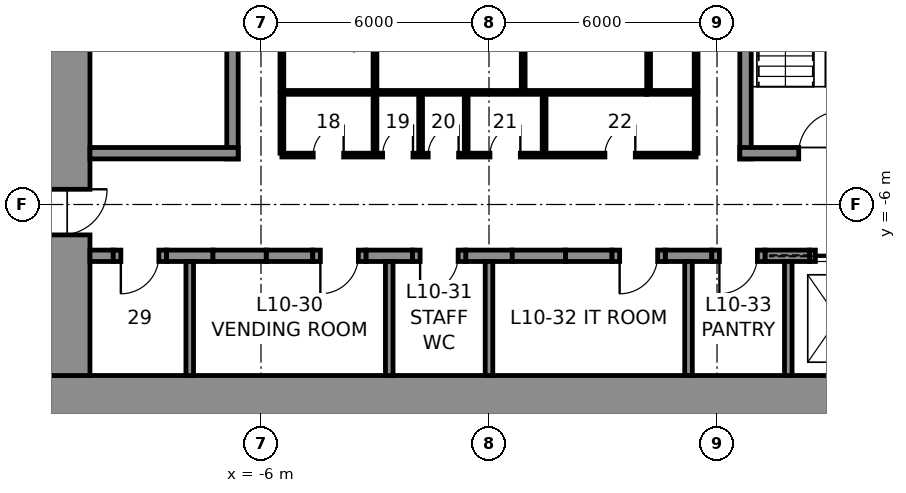
"""IFC4 building model, lengths in metres.
Left out: names, types, materials, properties, quantities, classifications, styles, units other than length and angle.
Written with IfcOpenShell. Run it as: python <this file> out.ifc"""

import sys

from ifc_helpers import new_model, si_unit, direction, frame, frame_2d, origin, place, context, subcontext, project, spatial, rectangle, extrude, element, fill, save


model = new_model("IFC4")
c1 = context("Model", 3, precision=1e-05, world=origin(), true_north=direction((0.0, 1.0)))
c2 = subcontext(c1, "Body", "Model", "MODEL_VIEW")
j1 = project(units=[si_unit("LENGTHUNIT", "METRE"), si_unit("PLANEANGLEUNIT", "RADIAN")], contexts=[c1])
p1 = place(None, origin())
s1 = spatial("IfcSite", under=j1, at=p1, CompositionType="ELEMENT")
p2 = place(p1, origin())
s2 = spatial("IfcBuilding", under=s1, at=p2, CompositionType="ELEMENT")
p3 = place(p2, frame((0.0, 0.0, 54.0)))
s3 = spatial("IfcBuildingStorey", under=s2, at=p3, CompositionType="ELEMENT", Elevation=54.0)
p4 = place(p3, frame((12.0, -11.25, 0.0), z_axis=(0.0, 0.0, 1.0), x_axis=(-1.0, 0.0, 0.0)))
e1 = element("IfcWall", 1, at=p4, inside=s3, PredefinedType="SHEAR", context=c2, shape_type="SweptSolid", body=[
    extrude(rectangle(XDim=24.0, YDim=1.5, at=frame_2d((12.0, 0.0))), origin(), (0.0, 0.0, 1.0), 5.5),
])
p5 = place(p3, frame((-11.25, -10.5, 0.0), z_axis=(0.0, 0.0, 1.0), x_axis=(0.0, 1.0, 0.0)))
e2 = element("IfcWall", 2, at=p5, inside=s3, PredefinedType="SHEAR", context=c2, shape_type="SweptSolid", body=[
    extrude(rectangle(XDim=21.0, YDim=1.5, at=frame_2d((10.5, 0.0))), origin(), (0.0, 0.0, 1.0), 5.5),
])
p6 = place(p5, frame((16.1, 0.0, 0.0)))
e3 = element("IfcOpeningElement", 3, at=p6, cuts=e2, PredefinedType="OPENING", context=c2, shape_type="SweptSolid", body=[
    extrude(rectangle(XDim=1.2, YDim=2.3, at=frame_2d((0.6, 1.15))), frame((0.0, 0.76, 0.0), z_axis=(0.0, -1.0, 0.0), x_axis=(1.0, 0.0, 0.0)), (0.0, 0.0, 1.0), 1.52),
])
p7 = place(p5, frame((3.7, 0.0, 0.0)))
e4 = element("IfcOpeningElement", 4, at=p7, cuts=e2, PredefinedType="OPENING", context=c2, shape_type="SweptSolid", body=[
    extrude(rectangle(XDim=1.2, YDim=2.3, at=frame_2d((0.6, 1.15))), frame((0.0, 0.76, 0.0), z_axis=(0.0, -1.0, 0.0), x_axis=(1.0, 0.0, 0.0)), (0.0, 0.0, 1.0), 1.52),
])
p8 = place(p3, frame((-10.5, -7.35, 0.0), z_axis=(0.0, 0.0, 1.0), x_axis=(1.0, 0.0, 0.0)))
e5 = element("IfcWall", 5, at=p8, inside=s3, PredefinedType="SHEAR", context=c2, shape_type="SweptSolid", body=[
    extrude(rectangle(XDim=0.613, YDim=0.3, at=frame_2d((0.306, 0.0))), origin(), (0.0, 0.0, 1.0), 5.5),
])
for number, where, z_axis, x_axis in (
    (6, (-8.488, -7.35, 0.0), (0.0, 0.0, 1.0), (1.0, 0.0, 0.0)),
    (7, (-5.863, -7.35, 0.0), (0.0, 0.0, 1.0), (1.0, 0.0, 0.0)),
    (8, (-3.238, -7.35, 0.0), (0.0, 0.0, 1.0), (1.0, 0.0, 0.0)),
    (9, (-0.613, -7.35, 0.0), (0.0, 0.0, 1.0), (1.0, 0.0, 0.0)),
    (10, (2.012, -7.35, 0.0), (0.0, 0.0, 1.0), (1.0, 0.0, 0.0)),
    (11, (4.637, -7.35, 0.0), (0.0, 0.0, 1.0), (1.0, 0.0, 0.0)),
):
    element("IfcWall", number, at=place(p3, frame(where, z_axis=z_axis, x_axis=x_axis)), inside=s3, PredefinedType="SHEAR", context=c2, shape_type="SweptSolid", body=[
        extrude(rectangle(XDim=1.225, YDim=0.3, at=frame_2d((0.613, 0.0))), origin(), (0.0, 0.0, 1.0), 5.5),
    ])
p9 = place(p3, frame((7.262, -7.35, 0.0), z_axis=(0.0, 0.0, 1.0), x_axis=(1.0, 0.0, 0.0)))
e12 = element("IfcWall", 12, at=p9, inside=s3, PredefinedType="SHEAR", context=c2, shape_type="SweptSolid", body=[
    extrude(rectangle(XDim=1.175, YDim=0.3, at=frame_2d((0.587, 0.0))), origin(), (0.0, 0.0, 1.0), 5.5),
])
p10 = place(p3, frame((-9.887, -7.35, 0.0), z_axis=(0.0, 0.0, 1.0), x_axis=(1.0, 0.0, 0.0)))
e13 = element("IfcWall", 13, at=p10, inside=s3, PredefinedType="PARTITIONING", context=c2, shape_type="SweptSolid", body=[
    extrude(rectangle(XDim=1.4, YDim=0.3, at=frame_2d((0.7, 0.0))), origin(), (0.0, 0.0, 1.0), 5.5),
])
p11 = place(p10, frame((0.2, 0.0, 0.0)))
e14 = element("IfcOpeningElement", 14, at=p11, cuts=e13, PredefinedType="OPENING", context=c2, shape_type="SweptSolid", body=[
    extrude(rectangle(XDim=1.0, YDim=2.3, at=frame_2d((0.5, 1.15))), frame((0.0, 0.16, 0.0), z_axis=(0.0, -1.0, 0.0), x_axis=(1.0, 0.0, 0.0)), (0.0, 0.0, 1.0), 0.32),
])
p12 = place(p3, frame((-7.262, -7.35, 0.0), z_axis=(0.0, 0.0, 1.0), x_axis=(1.0, 0.0, 0.0)))
e15 = element("IfcWall", 15, at=p12, inside=s3, PredefinedType="PARTITIONING", context=c2, shape_type="SweptSolid", body=[
    extrude(rectangle(XDim=1.4, YDim=0.3, at=frame_2d((0.7, 0.0))), origin(), (0.0, 0.0, 1.0), 5.5),
])
p13 = place(p3, frame((-4.637, -7.35, 0.0), z_axis=(0.0, 0.0, 1.0), x_axis=(1.0, 0.0, 0.0)))
e16 = element("IfcWall", 16, at=p13, inside=s3, PredefinedType="PARTITIONING", context=c2, shape_type="SweptSolid", body=[
    extrude(rectangle(XDim=1.4, YDim=0.3, at=frame_2d((0.7, 0.0))), origin(), (0.0, 0.0, 1.0), 5.5),
])
p14 = place(p13, frame((0.2, 0.0, 0.0)))
e17 = element("IfcOpeningElement", 17, at=p14, cuts=e16, PredefinedType="OPENING", context=c2, shape_type="SweptSolid", body=[
    extrude(rectangle(XDim=1.0, YDim=2.3, at=frame_2d((0.5, 1.15))), frame((0.0, 0.16, 0.0), z_axis=(0.0, -1.0, 0.0), x_axis=(1.0, 0.0, 0.0)), (0.0, 0.0, 1.0), 0.32),
])
p15 = place(p3, frame((-2.012, -7.35, 0.0), z_axis=(0.0, 0.0, 1.0), x_axis=(1.0, 0.0, 0.0)))
e18 = element("IfcWall", 18, at=p15, inside=s3, PredefinedType="PARTITIONING", context=c2, shape_type="SweptSolid", body=[
    extrude(rectangle(XDim=1.4, YDim=0.3, at=frame_2d((0.7, 0.0))), origin(), (0.0, 0.0, 1.0), 5.5),
])
p16 = place(p15, frame((0.2, 0.0, 0.0)))
e19 = element("IfcOpeningElement", 19, at=p16, cuts=e18, PredefinedType="OPENING", context=c2, shape_type="SweptSolid", body=[
    extrude(rectangle(XDim=1.0, YDim=2.3, at=frame_2d((0.5, 1.15))), frame((0.0, 0.16, 0.0), z_axis=(0.0, -1.0, 0.0), x_axis=(1.0, 0.0, 0.0)), (0.0, 0.0, 1.0), 0.32),
])
p17 = place(p3, frame((0.613, -7.35, 0.0), z_axis=(0.0, 0.0, 1.0), x_axis=(1.0, 0.0, 0.0)))
e20 = element("IfcWall", 20, at=p17, inside=s3, PredefinedType="PARTITIONING", context=c2, shape_type="SweptSolid", body=[
    extrude(rectangle(XDim=1.4, YDim=0.3, at=frame_2d((0.7, 0.0))), origin(), (0.0, 0.0, 1.0), 5.5),
])
p18 = place(p3, frame((3.238, -7.35, 0.0), z_axis=(0.0, 0.0, 1.0), x_axis=(1.0, 0.0, 0.0)))
e21 = element("IfcWall", 21, at=p18, inside=s3, PredefinedType="PARTITIONING", context=c2, shape_type="SweptSolid", body=[
    extrude(rectangle(XDim=1.4, YDim=0.3, at=frame_2d((0.7, 0.0))), origin(), (0.0, 0.0, 1.0), 5.5),
])
p19 = place(p18, frame((0.2, 0.0, 0.0)))
e22 = element("IfcOpeningElement", 22, at=p19, cuts=e21, PredefinedType="OPENING", context=c2, shape_type="SweptSolid", body=[
    extrude(rectangle(XDim=1.0, YDim=2.3, at=frame_2d((0.5, 1.15))), frame((0.0, 0.16, 0.0), z_axis=(0.0, -1.0, 0.0), x_axis=(1.0, 0.0, 0.0)), (0.0, 0.0, 1.0), 0.32),
])
p20 = place(p3, frame((5.863, -7.35, 0.0), z_axis=(0.0, 0.0, 1.0), x_axis=(1.0, 0.0, 0.0)))
e23 = element("IfcWall", 23, at=p20, inside=s3, PredefinedType="PARTITIONING", context=c2, shape_type="SweptSolid", body=[
    extrude(rectangle(XDim=1.4, YDim=0.3, at=frame_2d((0.7, 0.0))), origin(), (0.0, 0.0, 1.0), 5.5),
])
p21 = place(p20, frame((0.2, 0.0, 0.0)))
e24 = element("IfcOpeningElement", 24, at=p21, cuts=e23, PredefinedType="OPENING", context=c2, shape_type="SweptSolid", body=[
    extrude(rectangle(XDim=1.0, YDim=2.3, at=frame_2d((0.5, 1.15))), frame((0.0, 0.16, 0.0), z_axis=(0.0, -1.0, 0.0), x_axis=(1.0, 0.0, 0.0)), (0.0, 0.0, 1.0), 0.32),
])
p22 = place(p3, frame((8.438, -7.35, 0.0), z_axis=(0.0, 0.0, 1.0), x_axis=(1.0, 0.0, 0.0)))
e25 = element("IfcWall", 25, at=p22, inside=s3, PredefinedType="PARTITIONING", context=c2, shape_type="SweptSolid", body=[
    extrude(rectangle(XDim=1.5, YDim=0.3, at=frame_2d((0.75, 0.0))), origin(), (0.0, 0.0, 1.0), 5.5),
])
p23 = place(p22, frame((0.15, 0.0, 0.0)))
e26 = element("IfcOpeningElement", 26, at=p23, cuts=e25, PredefinedType="OPENING", context=c2, shape_type="SweptSolid", body=[
    extrude(rectangle(XDim=1.2, YDim=2.3, at=frame_2d((0.6, 1.15))), frame((0.0, 0.16, 0.0), z_axis=(0.0, -1.0, 0.0), x_axis=(1.0, 0.0, 0.0)), (0.0, 0.0, 1.0), 0.32),
])
for number, where, z_axis, x_axis in (
    (27, (-7.875, -10.5, 0.0), (0.0, 0.0, 1.0), (0.0, 1.0, 0.0)),
    (28, (-2.625, -10.5, 0.0), (0.0, 0.0, 1.0), (0.0, 1.0, 0.0)),
    (29, (0.0, -10.5, 0.0), (0.0, 0.0, 1.0), (0.0, 1.0, 0.0)),
    (30, (5.25, -10.5, 0.0), (0.0, 0.0, 1.0), (0.0, 1.0, 0.0)),
    (31, (7.875, -10.5, 0.0), (0.0, 0.0, 1.0), (0.0, 1.0, 0.0)),
):
    element("IfcWall", number, at=place(p3, frame(where, z_axis=z_axis, x_axis=x_axis)), inside=s3, PredefinedType="PARTITIONING", context=c2, shape_type="SweptSolid", body=[
        extrude(rectangle(XDim=3.0, YDim=0.2, at=frame_2d((1.5, 0.0))), origin(), (0.0, 0.0, 1.0), 5.5),
    ])
p24 = place(p3, frame((-6.75, -4.8, 0.0), z_axis=(0.0, 0.0, 1.0), x_axis=(0.0, 1.0, 0.0)))
e32 = element("IfcWall", 32, at=p24, inside=s3, PredefinedType="SOLIDWALL", context=c2, shape_type="SweptSolid", body=[
    extrude(rectangle(XDim=9.6, YDim=0.3, at=frame_2d((4.8, 0.0))), origin(), (0.0, 0.0, 1.0), 5.25),
])
p25 = place(p3, frame((-6.6, -4.65, 0.0), z_axis=(0.0, 0.0, 1.0), x_axis=(-1.0, 0.0, 0.0)))
e33 = element("IfcWall", 33, at=p25, inside=s3, PredefinedType="SOLIDWALL", context=c2, shape_type="SweptSolid", body=[
    extrude(rectangle(XDim=3.9, YDim=0.3, at=frame_2d((1.95, 0.0))), origin(), (0.0, 0.0, 1.0), 5.25),
])
p26 = place(p3, frame((6.75, -4.8, 0.0), z_axis=(0.0, 0.0, 1.0), x_axis=(0.0, 1.0, 0.0)))
e34 = element("IfcWall", 34, at=p26, inside=s3, PredefinedType="SOLIDWALL", context=c2, shape_type="SweptSolid", body=[
    extrude(rectangle(XDim=9.6, YDim=0.3, at=frame_2d((4.8, 0.0))), origin(), (0.0, 0.0, 1.0), 5.25),
])
p27 = place(p3, frame((10.5, -4.65, 0.0), z_axis=(0.0, 0.0, 1.0), x_axis=(-1.0, 0.0, 0.0)))
e35 = element("IfcWall", 35, at=p27, inside=s3, PredefinedType="SOLIDWALL", context=c2, shape_type="SweptSolid", body=[
    extrude(rectangle(XDim=3.9, YDim=0.3, at=frame_2d((1.95, 0.0))), origin(), (0.0, 0.0, 1.0), 5.25),
])
p28 = place(p27, frame((1.25, 0.0, 0.0)))
e36 = element("IfcOpeningElement", 36, at=p28, cuts=e35, PredefinedType="OPENING", context=c2, shape_type="SweptSolid", body=[
    extrude(rectangle(XDim=1.1, YDim=2.3, at=frame_2d((0.55, 1.15))), frame((0.0, 0.16, 0.0), z_axis=(0.0, -1.0, 0.0), x_axis=(1.0, 0.0, 0.0)), (0.0, 0.0, 1.0), 0.32),
])
p29 = place(p3, frame((4.15, -3.05, 0.0), z_axis=(0.0, 0.0, 1.0), x_axis=(-1.0, 0.0, 0.0)))
e37 = element("IfcWall", 37, at=p29, inside=s3, PredefinedType="PARTITIONING", context=c2, shape_type="SweptSolid", body=[
    extrude(rectangle(XDim=9.6, YDim=0.1, at=frame_2d((4.8, 0.0))), origin(), (0.0, 0.0, 1.0), 5.25),
])
p30 = place(p3, frame((5.45, -3.05, 0.0), z_axis=(0.0, 0.0, 1.0), x_axis=(-1.0, 0.0, 0.0)))
e38 = element("IfcWall", 38, at=p30, inside=s3, PredefinedType="PARTITIONING", context=c2, shape_type="SweptSolid", body=[
    extrude(rectangle(XDim=1.3, YDim=0.1, at=frame_2d((0.65, 0.0))), origin(), (0.0, 0.0, 1.0), 5.25),
])
for number, where, z_axis, x_axis in (
    (39, (5.45, 3.0, 0.0), (0.0, 0.0, 1.0), (0.0, -1.0, 0.0)),
    (40, (-5.45, -3.0, 0.0), (0.0, 0.0, 1.0), (0.0, 1.0, 0.0)),
    (41, (-3.0, -3.0, 0.0), (0.0, 0.0, 1.0), (0.0, 1.0, 0.0)),
    (42, (0.9, -3.0, 0.0), (0.0, 0.0, 1.0), (0.0, 1.0, 0.0)),
    (43, (4.2, -3.0, 0.0), (0.0, 0.0, 1.0), (0.0, 1.0, 0.0)),
):
    element("IfcWall", number, at=place(p3, frame(where, z_axis=z_axis, x_axis=x_axis)), inside=s3, PredefinedType="PARTITIONING", context=c2, shape_type="SweptSolid", body=[
        extrude(rectangle(XDim=6.0, YDim=0.1, at=frame_2d((3.0, 0.0))), origin(), (0.0, 0.0, 1.0), 5.25),
    ])
p31 = place(p3, frame((5.45, -4.7, 0.0), z_axis=(0.0, 0.0, 1.0), x_axis=(-1.0, 0.0, 0.0)))
e44 = element("IfcWall", 44, at=p31, inside=s3, PredefinedType="PARTITIONING", context=c2, shape_type="SweptSolid", body=[
    extrude(rectangle(XDim=10.9, YDim=0.1, at=frame_2d((5.45, 0.0))), origin(), (0.0, 0.0, 1.0), 5.25),
])
p32 = place(p31, frame((9.275, 0.0, 0.0)))
e45 = element("IfcOpeningElement", 45, at=p32, cuts=e44, PredefinedType="OPENING", context=c2, shape_type="SweptSolid", body=[
    extrude(rectangle(XDim=0.8, YDim=2.3, at=frame_2d((0.4, 1.15))), frame((0.0, 0.06, 0.0), z_axis=(0.0, -1.0, 0.0), x_axis=(1.0, 0.0, 0.0)), (0.0, 0.0, 1.0), 0.12),
])
p33 = place(p31, frame((7.45, 0.0, 0.0)))
e46 = element("IfcOpeningElement", 46, at=p33, cuts=e44, PredefinedType="OPENING", context=c2, shape_type="SweptSolid", body=[
    extrude(rectangle(XDim=0.8, YDim=2.3, at=frame_2d((0.4, 1.15))), frame((0.0, 0.06, 0.0), z_axis=(0.0, -1.0, 0.0), x_axis=(1.0, 0.0, 0.0)), (0.0, 0.0, 1.0), 0.12),
])
p34 = place(p31, frame((6.25, 0.0, 0.0)))
e47 = element("IfcOpeningElement", 47, at=p34, cuts=e44, PredefinedType="OPENING", context=c2, shape_type="SweptSolid", body=[
    extrude(rectangle(XDim=0.8, YDim=2.3, at=frame_2d((0.4, 1.15))), frame((0.0, 0.06, 0.0), z_axis=(0.0, -1.0, 0.0), x_axis=(1.0, 0.0, 0.0)), (0.0, 0.0, 1.0), 0.12),
])
p35 = place(p31, frame((4.625, 0.0, 0.0)))
e48 = element("IfcOpeningElement", 48, at=p35, cuts=e44, PredefinedType="OPENING", context=c2, shape_type="SweptSolid", body=[
    extrude(rectangle(XDim=0.8, YDim=2.3, at=frame_2d((0.4, 1.15))), frame((0.0, 0.06, 0.0), z_axis=(0.0, -1.0, 0.0), x_axis=(1.0, 0.0, 0.0)), (0.0, 0.0, 1.0), 0.12),
])
p36 = place(p31, frame((1.6, 0.0, 0.0)))
e49 = element("IfcOpeningElement", 49, at=p36, cuts=e44, PredefinedType="OPENING", context=c2, shape_type="SweptSolid", body=[
    extrude(rectangle(XDim=0.8, YDim=2.3, at=frame_2d((0.4, 1.15))), frame((0.0, 0.06, 0.0), z_axis=(0.0, -1.0, 0.0), x_axis=(1.0, 0.0, 0.0)), (0.0, 0.0, 1.0), 0.12),
])
for number, where, z_axis, x_axis in (
    (50, (-5.45, -3.1, 0.0), (0.0, 0.0, 1.0), (0.0, -1.0, 0.0)),
    (51, (5.45, -3.1, 0.0), (0.0, 0.0, 1.0), (0.0, -1.0, 0.0)),
    (52, (-3.0, -3.1, 0.0), (0.0, 0.0, 1.0), (0.0, -1.0, 0.0)),
    (53, (-1.8, -3.1, 0.0), (0.0, 0.0, 1.0), (0.0, -1.0, 0.0)),
    (54, (-0.6, -3.1, 0.0), (0.0, 0.0, 1.0), (0.0, -1.0, 0.0)),
    (55, (1.45, -3.1, 0.0), (0.0, 0.0, 1.0), (0.0, -1.0, 0.0)),
):
    element("IfcWall", number, at=place(p3, frame(where, z_axis=z_axis, x_axis=x_axis)), inside=s3, PredefinedType="PARTITIONING", context=c2, shape_type="SweptSolid", body=[
        extrude(rectangle(XDim=1.55, YDim=0.1, at=frame_2d((0.775, 0.0))), origin(), (0.0, 0.0, 1.0), 5.25),
    ])
p37 = place(p28, frame((1.1, 0.0, 0.0), z_axis=(0.0, 0.0, 1.0), x_axis=(-1.0, 0.0, 0.0)))
e56 = element("IfcDoor", 56, at=p37, inside=s3, OperationType="SINGLE_SWING_RIGHT", PredefinedType="DOOR", context=c2, shape_type="SweptSolid", body=[
    extrude(rectangle(XDim=1.1, YDim=2.3, at=frame_2d((0.55, 1.15))), frame((0.0, 0.025, 0.0), z_axis=(0.0, -1.0, 0.0), x_axis=(1.0, 0.0, 0.0)), (0.0, 0.0, 1.0), 0.05),
])
fill(e36, e56)
p38 = place(p32, frame((0.8, 0.0, 0.0), z_axis=(0.0, 0.0, 1.0), x_axis=(-1.0, 0.0, 0.0)))
e57 = element("IfcDoor", 57, at=p38, inside=s3, OperationType="SINGLE_SWING_RIGHT", PredefinedType="DOOR", context=c2, shape_type="SweptSolid", body=[
    extrude(rectangle(XDim=0.8, YDim=2.3, at=frame_2d((0.4, 1.15))), frame((0.0, 0.025, 0.0), z_axis=(0.0, -1.0, 0.0), x_axis=(1.0, 0.0, 0.0)), (0.0, 0.0, 1.0), 0.05),
])
fill(e45, e57)
p39 = place(p33, frame((0.8, 0.0, 0.0), z_axis=(0.0, 0.0, 1.0), x_axis=(-1.0, 0.0, 0.0)))
e58 = element("IfcDoor", 58, at=p39, inside=s3, OperationType="SINGLE_SWING_RIGHT", PredefinedType="DOOR", context=c2, shape_type="SweptSolid", body=[
    extrude(rectangle(XDim=0.8, YDim=2.3, at=frame_2d((0.4, 1.15))), frame((0.0, 0.025, 0.0), z_axis=(0.0, -1.0, 0.0), x_axis=(1.0, 0.0, 0.0)), (0.0, 0.0, 1.0), 0.05),
])
fill(e46, e58)
p40 = place(p34, frame((0.8, 0.0, 0.0), z_axis=(0.0, 0.0, 1.0), x_axis=(-1.0, 0.0, 0.0)))
e59 = element("IfcDoor", 59, at=p40, inside=s3, OperationType="SINGLE_SWING_RIGHT", PredefinedType="DOOR", context=c2, shape_type="SweptSolid", body=[
    extrude(rectangle(XDim=0.8, YDim=2.3, at=frame_2d((0.4, 1.15))), frame((0.0, 0.025, 0.0), z_axis=(0.0, -1.0, 0.0), x_axis=(1.0, 0.0, 0.0)), (0.0, 0.0, 1.0), 0.05),
])
fill(e47, e59)
p41 = place(p35, frame((0.8, 0.0, 0.0), z_axis=(0.0, 0.0, 1.0), x_axis=(-1.0, 0.0, 0.0)))
e60 = element("IfcDoor", 60, at=p41, inside=s3, OperationType="SINGLE_SWING_RIGHT", PredefinedType="DOOR", context=c2, shape_type="SweptSolid", body=[
    extrude(rectangle(XDim=0.8, YDim=2.3, at=frame_2d((0.4, 1.15))), frame((0.0, 0.025, 0.0), z_axis=(0.0, -1.0, 0.0), x_axis=(1.0, 0.0, 0.0)), (0.0, 0.0, 1.0), 0.05),
])
fill(e48, e60)
p42 = place(p36, frame((0.8, 0.0, 0.0), z_axis=(0.0, 0.0, 1.0), x_axis=(-1.0, 0.0, 0.0)))
e61 = element("IfcDoor", 61, at=p42, inside=s3, OperationType="SINGLE_SWING_RIGHT", PredefinedType="DOOR", context=c2, shape_type="SweptSolid", body=[
    extrude(rectangle(XDim=0.8, YDim=2.3, at=frame_2d((0.4, 1.15))), frame((0.0, 0.025, 0.0), z_axis=(0.0, -1.0, 0.0), x_axis=(1.0, 0.0, 0.0)), (0.0, 0.0, 1.0), 0.05),
])
fill(e49, e61)
p43 = place(p11, frame((1.0, 0.0, 0.0), z_axis=(0.0, 0.0, 1.0), x_axis=(-1.0, 0.0, 0.0)))
e62 = element("IfcDoor", 62, at=p43, inside=s3, OperationType="SINGLE_SWING_RIGHT", PredefinedType="DOOR", context=c2, shape_type="SweptSolid", body=[
    extrude(rectangle(XDim=1.0, YDim=2.3, at=frame_2d((0.5, 1.15))), frame((0.0, 0.025, 0.0), z_axis=(0.0, -1.0, 0.0), x_axis=(1.0, 0.0, 0.0)), (0.0, 0.0, 1.0), 0.05),
])
fill(e14, e62)
p44 = place(p14, frame((1.0, 0.0, 0.0), z_axis=(0.0, 0.0, 1.0), x_axis=(-1.0, 0.0, 0.0)))
e63 = element("IfcDoor", 63, at=p44, inside=s3, OperationType="SINGLE_SWING_RIGHT", PredefinedType="DOOR", context=c2, shape_type="SweptSolid", body=[
    extrude(rectangle(XDim=1.0, YDim=2.3, at=frame_2d((0.5, 1.15))), frame((0.0, 0.025, 0.0), z_axis=(0.0, -1.0, 0.0), x_axis=(1.0, 0.0, 0.0)), (0.0, 0.0, 1.0), 0.05),
])
fill(e17, e63)
p45 = place(p16, frame((1.0, 0.0, 0.0), z_axis=(0.0, 0.0, 1.0), x_axis=(-1.0, 0.0, 0.0)))
e64 = element("IfcDoor", 64, at=p45, inside=s3, OperationType="SINGLE_SWING_RIGHT", PredefinedType="DOOR", context=c2, shape_type="SweptSolid", body=[
    extrude(rectangle(XDim=1.0, YDim=2.3, at=frame_2d((0.5, 1.15))), frame((0.0, 0.025, 0.0), z_axis=(0.0, -1.0, 0.0), x_axis=(1.0, 0.0, 0.0)), (0.0, 0.0, 1.0), 0.05),
])
fill(e19, e64)
p46 = place(p19, frame((1.0, 0.0, 0.0), z_axis=(0.0, 0.0, 1.0), x_axis=(-1.0, 0.0, 0.0)))
e65 = element("IfcDoor", 65, at=p46, inside=s3, OperationType="SINGLE_SWING_RIGHT", PredefinedType="DOOR", context=c2, shape_type="SweptSolid", body=[
    extrude(rectangle(XDim=1.0, YDim=2.3, at=frame_2d((0.5, 1.15))), frame((0.0, 0.025, 0.0), z_axis=(0.0, -1.0, 0.0), x_axis=(1.0, 0.0, 0.0)), (0.0, 0.0, 1.0), 0.05),
])
fill(e22, e65)
p47 = place(p21, frame((1.0, 0.0, 0.0), z_axis=(0.0, 0.0, 1.0), x_axis=(-1.0, 0.0, 0.0)))
e66 = element("IfcDoor", 66, at=p47, inside=s3, OperationType="SINGLE_SWING_RIGHT", PredefinedType="DOOR", context=c2, shape_type="SweptSolid", body=[
    extrude(rectangle(XDim=1.0, YDim=2.3, at=frame_2d((0.5, 1.15))), frame((0.0, 0.025, 0.0), z_axis=(0.0, -1.0, 0.0), x_axis=(1.0, 0.0, 0.0)), (0.0, 0.0, 1.0), 0.05),
])
fill(e24, e66)
p48 = place(p7, frame((1.2, 0.0, 0.0), z_axis=(0.0, 0.0, 1.0), x_axis=(-1.0, 0.0, 0.0)))
e67 = element("IfcDoor", 67, at=p48, inside=s3, OperationType="SINGLE_SWING_LEFT", PredefinedType="DOOR", context=c2, shape_type="SweptSolid", body=[
    extrude(rectangle(XDim=1.2, YDim=2.3, at=frame_2d((0.6, 1.15))), frame((0.0, 0.025, 0.0), z_axis=(0.0, -1.0, 0.0), x_axis=(1.0, 0.0, 0.0)), (0.0, 0.0, 1.0), 0.05),
])
fill(e4, e67)
p49 = place(p23, origin())
e68 = element("IfcDoor", 68, at=p49, inside=s3, OperationType="SLIDING_TO_LEFT", PredefinedType="DOOR", context=c2, shape_type="SweptSolid", body=[
    extrude(rectangle(XDim=1.2, YDim=2.3, at=frame_2d((0.6, 1.15))), frame((0.0, 0.025, 0.0), z_axis=(0.0, -1.0, 0.0), x_axis=(1.0, 0.0, 0.0)), (0.0, 0.0, 1.0), 0.05),
])
fill(e26, e68)
save(model, sys.argv[1])
